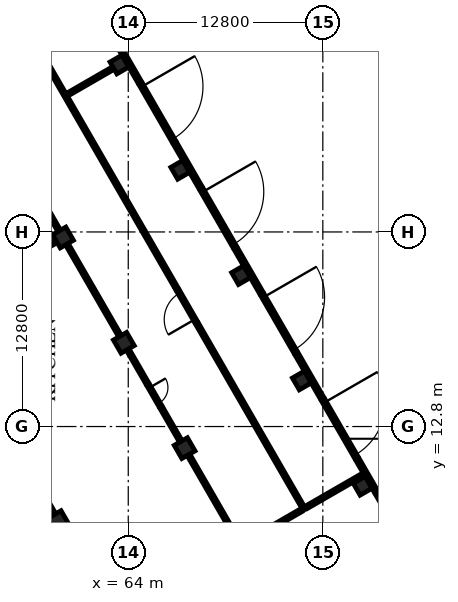
"""IFC4 building model, lengths in metres.
Left out: names, types, materials, properties, quantities, classifications, styles, units other than length and angle.
Written with IfcOpenShell. Run it as: python <this file> out.ifc"""

import sys

from ifc_helpers import new_model, si_unit, direction, frame, frame_2d, origin, origin_2d, place, context, subcontext, project, spatial, rectangle, extrude, element, fill, save


model = new_model("IFC4")
c1 = context("Model", 3, precision=1e-05, world=origin(), true_north=direction((0.0, 1.0)))
c2 = subcontext(c1, "Body", "Model", "MODEL_VIEW")
j1 = project(units=[si_unit("LENGTHUNIT", "METRE"), si_unit("PLANEANGLEUNIT", "RADIAN")], contexts=[c1])
p1 = place(None, origin())
s1 = spatial("IfcSite", under=j1, at=p1, CompositionType="ELEMENT")
p2 = place(p1, origin())
s2 = spatial("IfcBuilding", under=s1, at=p2, CompositionType="ELEMENT")
p3 = place(p2, origin())
s3 = spatial("IfcBuildingStorey", under=s2, at=p3, CompositionType="ELEMENT", Elevation=0.0)
p4 = place(p3, frame((79.417, 8.901, -0.3), z_axis=(0.0, 0.0, 1.0), x_axis=(-0.5, 0.866025403784, 0.0)))
e1 = element("IfcColumn", 1, at=p4, inside=s3, PredefinedType="COLUMN", context=c2, shape_type="SweptSolid", body=[
    extrude(rectangle(XDim=0.9, YDim=0.9, at=origin_2d()), origin(), (0.0, 0.0, 1.0), 6.3),
])
for number, where, z_axis, x_axis in (
    (2, (59.396, 6.579, -0.3), (0.0, 0.0, 1.0), (-0.5, 0.866, 0.0)),
    (3, (67.71, 11.379, -0.3), (0.0, 0.0, 1.0), (-0.5, 0.866, 0.0)),
):
    element("IfcColumn", number, at=place(p3, frame(where, z_axis=z_axis, x_axis=x_axis)), inside=s3, PredefinedType="COLUMN", context=c2, shape_type="SweptSolid", body=[
        extrude(rectangle(XDim=1.0, YDim=1.0, at=origin_2d()), origin(), (0.0, 0.0, 1.0), 6.3),
    ])
p5 = place(p3, frame((75.417, 15.829, -0.3), z_axis=(0.0, 0.0, 1.0), x_axis=(-0.5, 0.866025403784, 0.0)))
e4 = element("IfcColumn", 4, at=p5, inside=s3, PredefinedType="COLUMN", context=c2, shape_type="SweptSolid", body=[
    extrude(rectangle(XDim=0.9, YDim=0.9, at=origin_2d()), origin(), (0.0, 0.0, 1.0), 6.3),
])
p6 = place(p3, frame((63.71, 18.308, -0.3), z_axis=(0.0, 0.0, 1.0), x_axis=(-0.5, 0.866025403784, 0.0)))
e5 = element("IfcColumn", 5, at=p6, inside=s3, PredefinedType="COLUMN", context=c2, shape_type="SweptSolid", body=[
    extrude(rectangle(XDim=1.0, YDim=1.0, at=origin_2d()), origin(), (0.0, 0.0, 1.0), 6.3),
])
p7 = place(p3, frame((71.417, 22.758, -0.3), z_axis=(0.0, 0.0, 1.0), x_axis=(-0.5, 0.866025403784, 0.0)))
e6 = element("IfcColumn", 6, at=p7, inside=s3, PredefinedType="COLUMN", context=c2, shape_type="SweptSolid", body=[
    extrude(rectangle(XDim=0.9, YDim=0.9, at=origin_2d()), origin(), (0.0, 0.0, 1.0), 6.3),
])
p8 = place(p3, frame((59.71, 25.236, -0.3), z_axis=(0.0, 0.0, 1.0), x_axis=(-0.5, 0.866025403784, 0.0)))
e7 = element("IfcColumn", 7, at=p8, inside=s3, PredefinedType="COLUMN", context=c2, shape_type="SweptSolid", body=[
    extrude(rectangle(XDim=1.0, YDim=1.0, at=origin_2d()), origin(), (0.0, 0.0, 1.0), 6.3),
])
for number, where, z_axis, x_axis in (
    (8, (67.417, 29.686, -0.3), (0.0, 0.0, 1.0), (-0.5, 0.866, 0.0)),
    (9, (63.417, 36.614, -0.3), (0.0, 0.0, 1.0), (-0.5, 0.866, 0.0)),
):
    element("IfcColumn", number, at=place(p3, frame(where, z_axis=z_axis, x_axis=x_axis)), inside=s3, PredefinedType="COLUMN", context=c2, shape_type="SweptSolid", body=[
        extrude(rectangle(XDim=0.9, YDim=0.9, at=origin_2d()), origin(), (0.0, 0.0, 1.0), 6.3),
    ])
p9 = place(p3, frame((80.34, 8.453, 0.0), z_axis=(0.0, 0.0, 1.0), x_axis=(0.499952165731, -0.866053019151, 0.0)))
e10 = element("IfcWall", 10, at=p9, inside=s3, PredefinedType="SOLIDWALL", context=c2, shape_type="SweptSolid", body=[
    extrude(rectangle(XDim=2.3, YDim=0.25, at=frame_2d((1.15, 0.0))), origin(), (0.0, 0.0, 1.0), 5.7),
])
p10 = place(p9, frame((0.25, 0.0, 0.0)))
e11 = element("IfcOpeningElement", 11, at=p10, cuts=e10, PredefinedType="OPENING", context=c2, shape_type="SweptSolid", body=[
    extrude(rectangle(XDim=1.8, YDim=2.1, at=frame_2d((0.9, 1.05))), frame((0.0, 0.135, 0.0), z_axis=(0.0, -1.0, 0.0), x_axis=(1.0, 0.0, 0.0)), (0.0, 0.0, 1.0), 0.27),
])
p11 = place(p3, frame((79.04, 10.704, 0.0), z_axis=(0.0, 0.0, 1.0), x_axis=(0.500047596559, -0.865997922154, 0.0)))
e12 = element("IfcWall", 12, at=p11, inside=s3, PredefinedType="SOLIDWALL", context=c2, shape_type="SweptSolid", body=[
    extrude(rectangle(XDim=2.6, YDim=0.25, at=frame_2d((1.3, 0.0))), origin(), (0.0, 0.0, 1.0), 5.7),
])
p12 = place(p3, frame((76.79, 14.601, 0.0), z_axis=(0.0, 0.0, 1.0), x_axis=(0.499990139034, -0.866031096941, 0.0)))
e13 = element("IfcWall", 13, at=p12, inside=s3, PredefinedType="SOLIDWALL", context=c2, shape_type="SweptSolid", body=[
    extrude(rectangle(XDim=4.5, YDim=0.25, at=frame_2d((2.25, 0.0))), origin(), (0.0, 0.0, 1.0), 5.7),
])
p13 = place(p12, frame((0.25, 0.0, 0.0)))
e14 = element("IfcOpeningElement", 14, at=p13, cuts=e13, PredefinedType="OPENING", context=c2, shape_type="SweptSolid", body=[
    extrude(rectangle(XDim=4.0, YDim=4.0, at=frame_2d((2.0, 2.0))), frame((0.0, 0.135, 0.0), z_axis=(0.0, -1.0, 0.0), x_axis=(1.0, 0.0, 0.0)), (0.0, 0.0, 1.0), 0.27),
])
p14 = place(p3, frame((75.04, 17.633, 0.0), z_axis=(0.0, 0.0, 1.0), x_axis=(0.499980071345, -0.866036909293, 0.0)))
e15 = element("IfcWall", 15, at=p14, inside=s3, PredefinedType="SOLIDWALL", context=c2, shape_type="SweptSolid", body=[
    extrude(rectangle(XDim=3.5, YDim=0.25, at=frame_2d((1.75, 0.0))), origin(), (0.0, 0.0, 1.0), 5.7),
])
p15 = place(p3, frame((72.79, 21.53, 0.0), z_axis=(0.0, 0.0, 1.0), x_axis=(0.500013631625, -0.866017533419, 0.0)))
e16 = element("IfcWall", 16, at=p15, inside=s3, PredefinedType="SOLIDWALL", context=c2, shape_type="SweptSolid", body=[
    extrude(rectangle(XDim=4.5, YDim=0.25, at=frame_2d((2.25, 0.0))), origin(), (0.0, 0.0, 1.0), 5.7),
])
p16 = place(p15, frame((0.25, 0.0, 0.0)))
e17 = element("IfcOpeningElement", 17, at=p16, cuts=e16, PredefinedType="OPENING", context=c2, shape_type="SweptSolid", body=[
    extrude(rectangle(XDim=4.0, YDim=4.0, at=frame_2d((2.0, 2.0))), frame((0.0, 0.135, 0.0), z_axis=(0.0, -1.0, 0.0), x_axis=(1.0, 0.0, 0.0)), (0.0, 0.0, 1.0), 0.27),
])
p17 = place(p3, frame((71.04, 24.561, 0.0), z_axis=(0.0, 0.0, 1.0), x_axis=(0.499980071345, -0.866036909293, 0.0)))
e18 = element("IfcWall", 18, at=p17, inside=s3, PredefinedType="SOLIDWALL", context=c2, shape_type="SweptSolid", body=[
    extrude(rectangle(XDim=3.5, YDim=0.25, at=frame_2d((1.75, 0.0))), origin(), (0.0, 0.0, 1.0), 5.7),
])
p18 = place(p3, frame((68.79, 28.458, 0.0), z_axis=(0.0, 0.0, 1.0), x_axis=(0.500013631625, -0.866017533419, 0.0)))
e19 = element("IfcWall", 19, at=p18, inside=s3, PredefinedType="SOLIDWALL", context=c2, shape_type="SweptSolid", body=[
    extrude(rectangle(XDim=4.5, YDim=0.25, at=frame_2d((2.25, 0.0))), origin(), (0.0, 0.0, 1.0), 5.7),
])
p19 = place(p18, frame((0.25, 0.0, 0.0)))
e20 = element("IfcOpeningElement", 20, at=p19, cuts=e19, PredefinedType="OPENING", context=c2, shape_type="SweptSolid", body=[
    extrude(rectangle(XDim=4.0, YDim=4.0, at=frame_2d((2.0, 2.0))), frame((0.0, 0.135, 0.0), z_axis=(0.0, -1.0, 0.0), x_axis=(1.0, 0.0, 0.0)), (0.0, 0.0, 1.0), 0.27),
])
p20 = place(p3, frame((67.04, 31.489, 0.0), z_axis=(0.0, 0.0, 1.0), x_axis=(0.499980071345, -0.866036909293, 0.0)))
e21 = element("IfcWall", 21, at=p20, inside=s3, PredefinedType="SOLIDWALL", context=c2, shape_type="SweptSolid", body=[
    extrude(rectangle(XDim=3.5, YDim=0.25, at=frame_2d((1.75, 0.0))), origin(), (0.0, 0.0, 1.0), 5.7),
])
p21 = place(p3, frame((64.79, 35.386, 0.0), z_axis=(0.0, 0.0, 1.0), x_axis=(0.500013631625, -0.866017533419, 0.0)))
e22 = element("IfcWall", 22, at=p21, inside=s3, PredefinedType="SOLIDWALL", context=c2, shape_type="SweptSolid", body=[
    extrude(rectangle(XDim=4.5, YDim=0.25, at=frame_2d((2.25, 0.0))), origin(), (0.0, 0.0, 1.0), 5.7),
])
p22 = place(p21, frame((0.25, 0.0, 0.0)))
e23 = element("IfcOpeningElement", 23, at=p22, cuts=e22, PredefinedType="OPENING", context=c2, shape_type="SweptSolid", body=[
    extrude(rectangle(XDim=4.0, YDim=4.0, at=frame_2d((2.0, 2.0))), frame((0.0, 0.135, 0.0), z_axis=(0.0, -1.0, 0.0), x_axis=(1.0, 0.0, 0.0)), (0.0, 0.0, 1.0), 0.27),
])
p23 = place(p3, frame((47.49, 65.351, 0.0), z_axis=(0.0, 0.0, 1.0), x_axis=(0.499999548647, -0.866025664373, 0.0)))
e24 = element("IfcWall", 24, at=p23, inside=s3, PredefinedType="SOLIDWALL", context=c2, shape_type="SweptSolid", body=[
    extrude(rectangle(XDim=34.6, YDim=0.25, at=frame_2d((17.3, 0.0))), origin(), (0.0, 0.0, 1.0), 5.7),
])
p24 = place(p3, frame((59.146, 7.012, 0.0), z_axis=(0.0, 0.0, 1.0), x_axis=(-0.499993606316, 0.866029095148, 0.0)))
e25 = element("IfcWall", 25, at=p24, inside=s3, PredefinedType="PARTITIONING", context=c2, shape_type="SweptSolid", body=[
    extrude(rectangle(XDim=2.65, YDim=0.2, at=frame_2d((1.325, 0.0))), origin(), (0.0, 0.0, 1.0), 5.1),
])
p25 = place(p3, frame((71.397, 4.992, 0.0), z_axis=(0.0, 0.0, 1.0), x_axis=(-0.500004234368, 0.866022959057, 0.0)))
e26 = element("IfcWall", 26, at=p25, inside=s3, PredefinedType="PARTITIONING", context=c2, shape_type="SweptSolid", body=[
    extrude(rectangle(XDim=6.875, YDim=0.2, at=frame_2d((3.438, 0.0))), origin(), (0.0, 0.0, 1.0), 5.1),
])
p26 = place(p3, frame((67.46, 11.812, 0.0), z_axis=(0.0, 0.0, 1.0), x_axis=(-0.499993606316, 0.866029095148, 0.0)))
e27 = element("IfcWall", 27, at=p26, inside=s3, PredefinedType="PARTITIONING", context=c2, shape_type="SweptSolid", body=[
    extrude(rectangle(XDim=2.65, YDim=0.2, at=frame_2d((1.325, 0.0))), origin(), (0.0, 0.0, 1.0), 5.1),
])
p27 = place(p3, frame((65.285, 15.58, 0.0), z_axis=(0.0, 0.0, 1.0), x_axis=(0.500062241894, -0.865989465428, 0.0)))
e28 = element("IfcWall", 28, at=p27, inside=s3, PredefinedType="PARTITIONING", context=c2, shape_type="SweptSolid", body=[
    extrude(rectangle(XDim=1.7, YDim=0.2, at=frame_2d((0.85, 0.0))), origin(), (0.0, 0.0, 1.0), 5.1),
])
p28 = place(p27, frame((0.25, 0.0, 0.0)))
e29 = element("IfcOpeningElement", 29, at=p28, cuts=e28, PredefinedType="OPENING", context=c2, shape_type="SweptSolid", body=[
    extrude(rectangle(XDim=1.2, YDim=2.1, at=frame_2d((0.6, 1.05))), frame((0.0, 0.11, 0.0), z_axis=(0.0, -1.0, 0.0), x_axis=(1.0, 0.0, 0.0)), (0.0, 0.0, 1.0), 0.22),
])
p29 = place(p3, frame((65.285, 15.58, 0.0), z_axis=(0.0, 0.0, 1.0), x_axis=(-0.499993606316, 0.866029095148, 0.0)))
e30 = element("IfcWall", 30, at=p29, inside=s3, PredefinedType="PARTITIONING", context=c2, shape_type="SweptSolid", body=[
    extrude(rectangle(XDim=2.65, YDim=0.2, at=frame_2d((1.325, 0.0))), origin(), (0.0, 0.0, 1.0), 5.1),
])
for number, where, z_axis, x_axis in (
    (31, (63.46, 18.74, 0.0), (0.0, 0.0, 1.0), (-0.5, 0.866, 0.0)),
    (32, (59.46, 25.669, 0.0), (0.0, 0.0, 1.0), (-0.5, 0.866, 0.0)),
):
    element("IfcWall", number, at=place(p3, frame(where, z_axis=z_axis, x_axis=x_axis)), inside=s3, PredefinedType="PARTITIONING", context=c2, shape_type="SweptSolid", body=[
        extrude(rectangle(XDim=7.0, YDim=0.2, at=frame_2d((3.5, 0.0))), origin(), (0.0, 0.0, 1.0), 5.1),
    ])
p30 = place(p3, frame((75.554, 7.393, 0.0), z_axis=(0.0, 0.0, 1.0), x_axis=(-0.500005731256, 0.866022094817, 0.0)))
e33 = element("IfcWall", 33, at=p30, inside=s3, PredefinedType="PARTITIONING", context=c2, shape_type="SweptSolid", body=[
    extrude(rectangle(XDim=14.125, YDim=0.2, at=frame_2d((7.062, 0.0))), origin(), (0.0, 0.0, 1.0), 5.1),
])
p31 = place(p3, frame((68.492, 19.625, 0.0), z_axis=(0.0, 0.0, 1.0), x_axis=(-0.500004234368, 0.866022959057, 0.0)))
e34 = element("IfcWall", 34, at=p31, inside=s3, PredefinedType="PARTITIONING", context=c2, shape_type="SweptSolid", body=[
    extrude(rectangle(XDim=2.5, YDim=0.2, at=frame_2d((1.25, 0.0))), origin(), (0.0, 0.0, 1.0), 5.1),
])
p32 = place(p31, frame((0.25, 0.0, 0.0)))
e35 = element("IfcOpeningElement", 35, at=p32, cuts=e34, PredefinedType="OPENING", context=c2, shape_type="SweptSolid", body=[
    extrude(rectangle(XDim=2.0, YDim=2.1, at=frame_2d((1.0, 1.05))), frame((0.0, 0.11, 0.0), z_axis=(0.0, -1.0, 0.0), x_axis=(1.0, 0.0, 0.0)), (0.0, 0.0, 1.0), 0.22),
])
p33 = place(p3, frame((67.242, 21.79, 0.0), z_axis=(0.0, 0.0, 1.0), x_axis=(-0.500004551153, 0.866022776159, 0.0)))
e36 = element("IfcWall", 36, at=p33, inside=s3, PredefinedType="PARTITIONING", context=c2, shape_type="SweptSolid", body=[
    extrude(rectangle(XDim=21.9, YDim=0.2, at=frame_2d((10.95, 0.0))), origin(), (0.0, 0.0, 1.0), 5.1),
])
p34 = place(p3, frame((75.641, 7.442, 0.0), z_axis=(0.0, 0.0, 1.0), x_axis=(0.866012907634, 0.500021643343, 0.0)))
e37 = element("IfcWall", 37, at=p34, inside=s3, PredefinedType="PARTITIONING", context=c2, shape_type="SweptSolid", body=[
    extrude(rectangle(XDim=4.45, YDim=0.2, at=frame_2d((2.225, 0.0))), origin(), (0.0, 0.0, 1.0), 5.1),
])
p35 = place(p3, frame((51.829, 20.686, 0.0), z_axis=(0.0, 0.0, 1.0), x_axis=(0.866021068297, 0.500007509209, 0.0)))
e38 = element("IfcWall", 38, at=p35, inside=s3, PredefinedType="PARTITIONING", context=c2, shape_type="SweptSolid", body=[
    extrude(rectangle(XDim=8.6, YDim=0.2, at=frame_2d((4.3, 0.0))), origin(), (0.0, 0.0, 1.0), 5.1),
])
p36 = place(p3, frame((59.953, 34.614, 0.0), z_axis=(0.0, 0.0, 1.0), x_axis=(0.8660424351, 0.499970499736, 0.0)))
e39 = element("IfcWall", 39, at=p36, inside=s3, PredefinedType="PARTITIONING", context=c2, shape_type="SweptSolid", body=[
    extrude(rectangle(XDim=3.55, YDim=0.2, at=frame_2d((1.775, 0.0))), origin(), (0.0, 0.0, 1.0), 5.1),
])
p37 = place(p3, frame((75.468, 7.343, 0.0), z_axis=(0.0, 0.0, 1.0), x_axis=(-0.866016770315, -0.500014953309, 0.0)))
e40 = element("IfcWall", 40, at=p37, inside=s3, PredefinedType="PARTITIONING", context=c2, shape_type="SweptSolid", body=[
    extrude(rectangle(XDim=4.6, YDim=0.2, at=frame_2d((2.3, 0.0))), origin(), (0.0, 0.0, 1.0), 5.1),
])
p38 = place(p37, frame((1.4, 0.0, 0.0)))
e41 = element("IfcOpeningElement", 41, at=p38, cuts=e40, PredefinedType="OPENING", context=c2, shape_type="SweptSolid", body=[
    extrude(rectangle(XDim=1.8, YDim=2.1, at=frame_2d((0.9, 1.05))), frame((0.0, 0.11, 0.0), z_axis=(0.0, -1.0, 0.0), x_axis=(1.0, 0.0, 0.0)), (0.0, 0.0, 1.0), 0.22),
])
p39 = place(p10, origin())
e42 = element("IfcDoor", 42, at=p39, inside=s3, OperationType="DOUBLE_DOOR_SINGLE_SWING", PredefinedType="DOOR", context=c2, shape_type="SweptSolid", body=[
    extrude(rectangle(XDim=1.8, YDim=2.1, at=frame_2d((0.9, 1.05))), frame((0.0, 0.025, 0.0), z_axis=(0.0, -1.0, 0.0), x_axis=(1.0, 0.0, 0.0)), (0.0, 0.0, 1.0), 0.05),
])
fill(e11, e42)
p40 = place(p13, origin())
e43 = element("IfcDoor", 43, at=p40, inside=s3, OperationType="ROLLINGUP", PredefinedType="DOOR", context=c2, shape_type="SweptSolid", body=[
    extrude(rectangle(XDim=4.0, YDim=4.0, at=frame_2d((2.0, 2.0))), frame((0.0, 0.025, 0.0), z_axis=(0.0, -1.0, 0.0), x_axis=(1.0, 0.0, 0.0)), (0.0, 0.0, 1.0), 0.05),
])
fill(e14, e43)
p41 = place(p16, origin())
e44 = element("IfcDoor", 44, at=p41, inside=s3, OperationType="ROLLINGUP", PredefinedType="DOOR", context=c2, shape_type="SweptSolid", body=[
    extrude(rectangle(XDim=4.0, YDim=4.0, at=frame_2d((2.0, 2.0))), frame((0.0, 0.025, 0.0), z_axis=(0.0, -1.0, 0.0), x_axis=(1.0, 0.0, 0.0)), (0.0, 0.0, 1.0), 0.05),
])
fill(e17, e44)
p42 = place(p19, origin())
e45 = element("IfcDoor", 45, at=p42, inside=s3, OperationType="ROLLINGUP", PredefinedType="DOOR", context=c2, shape_type="SweptSolid", body=[
    extrude(rectangle(XDim=4.0, YDim=4.0, at=frame_2d((2.0, 2.0))), frame((0.0, 0.025, 0.0), z_axis=(0.0, -1.0, 0.0), x_axis=(1.0, 0.0, 0.0)), (0.0, 0.0, 1.0), 0.05),
])
fill(e20, e45)
p43 = place(p22, origin())
e46 = element("IfcDoor", 46, at=p43, inside=s3, OperationType="ROLLINGUP", PredefinedType="DOOR", context=c2, shape_type="SweptSolid", body=[
    extrude(rectangle(XDim=4.0, YDim=4.0, at=frame_2d((2.0, 2.0))), frame((0.0, 0.025, 0.0), z_axis=(0.0, -1.0, 0.0), x_axis=(1.0, 0.0, 0.0)), (0.0, 0.0, 1.0), 0.05),
])
fill(e23, e46)
p44 = place(p28, origin())
e47 = element("IfcDoor", 47, at=p44, inside=s3, OperationType="SINGLE_SWING_LEFT", PredefinedType="DOOR", context=c2, shape_type="SweptSolid", body=[
    extrude(rectangle(XDim=1.2, YDim=2.1, at=frame_2d((0.6, 1.05))), frame((0.0, 0.025, 0.0), z_axis=(0.0, -1.0, 0.0), x_axis=(1.0, 0.0, 0.0)), (0.0, 0.0, 1.0), 0.05),
])
fill(e29, e47)
p45 = place(p32, origin())
e48 = element("IfcDoor", 48, at=p45, inside=s3, OperationType="DOUBLE_DOOR_SINGLE_SWING", PredefinedType="DOOR", context=c2, shape_type="SweptSolid", body=[
    extrude(rectangle(XDim=2.0, YDim=2.1, at=frame_2d((1.0, 1.05))), frame((0.0, 0.025, 0.0), z_axis=(0.0, -1.0, 0.0), x_axis=(1.0, 0.0, 0.0)), (0.0, 0.0, 1.0), 0.05),
])
fill(e35, e48)
p46 = place(p38, origin())
e49 = element("IfcDoor", 49, at=p46, inside=s3, OperationType="DOUBLE_DOOR_SINGLE_SWING", PredefinedType="DOOR", context=c2, shape_type="SweptSolid", body=[
    extrude(rectangle(XDim=1.8, YDim=2.1, at=frame_2d((0.9, 1.05))), frame((0.0, 0.025, 0.0), z_axis=(0.0, -1.0, 0.0), x_axis=(1.0, 0.0, 0.0)), (0.0, 0.0, 1.0), 0.05),
])
fill(e41, e49)
save(model, sys.argv[1])
